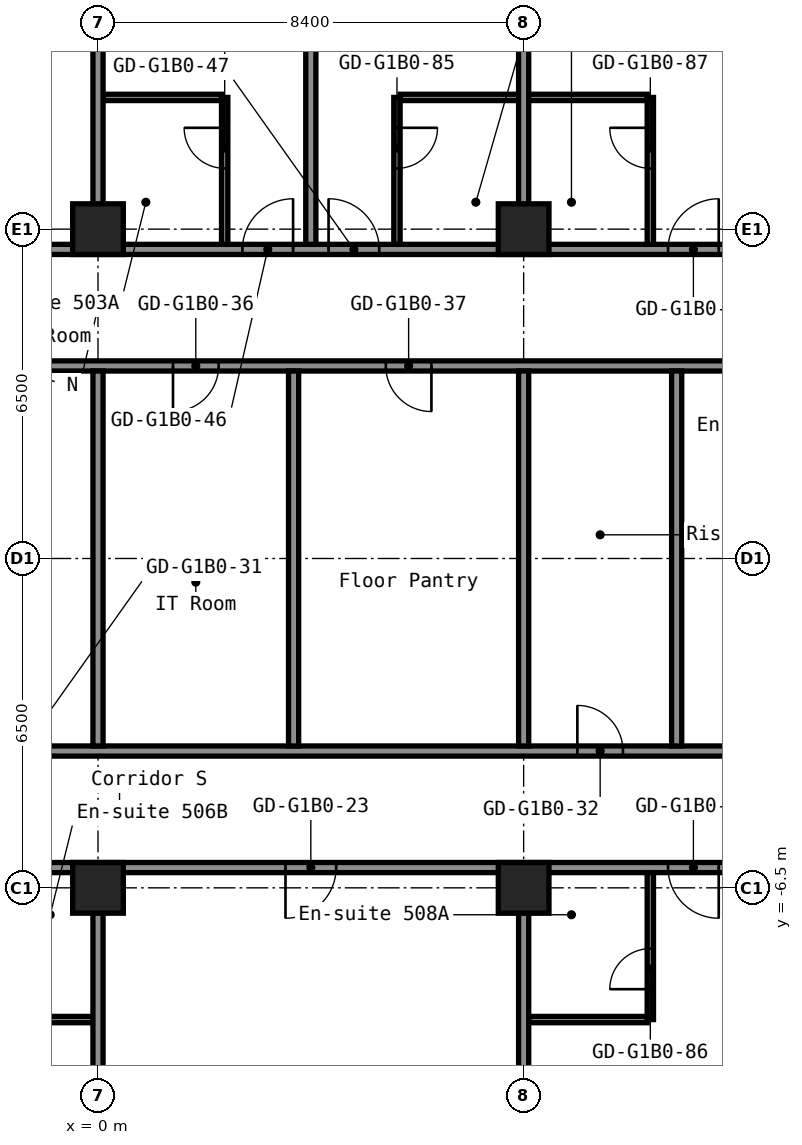
"""IFC4 building model, lengths in metres.
Left out: names, types, materials, properties, quantities, classifications, styles, units other than length and angle.
Written with IfcOpenShell. Run it as: python <this file> out.ifc"""

import sys

from ifc_helpers import new_model, si_unit, direction, frame, frame_2d, origin, origin_2d, place, context, subcontext, project, spatial, rectangle, hollow_rectangle, extrude, element, fill, save


model = new_model("IFC4")
c1 = context("Model", 3, precision=1e-05, world=origin(), true_north=direction((0.0, 1.0)))
c2 = subcontext(c1, "Body", "Model", "MODEL_VIEW")
j1 = project(units=[si_unit("LENGTHUNIT", "METRE"), si_unit("PLANEANGLEUNIT", "RADIAN")], contexts=[c1])
p1 = place(None, origin())
s1 = spatial("IfcSite", under=j1, at=p1, CompositionType="ELEMENT")
p2 = place(p1, origin())
s2 = spatial("IfcBuilding", under=s1, at=p2, CompositionType="ELEMENT")
p3 = place(p2, frame((0.0, 0.0, 23.0)))
s3 = spatial("IfcBuildingStorey", under=s2, at=p3, CompositionType="ELEMENT", Elevation=23.0)
for number, where, z_axis, x_axis in (
    (1, (0.0, -6.5, 0.0), (0.0, 0.0, 1.0), (1.0, 0.0, 0.0)),
    (2, (0.0, 6.5, 0.0), (0.0, 0.0, 1.0), (1.0, 0.0, 0.0)),
    (3, (8.4, -6.5, 0.0), (0.0, 0.0, 1.0), (1.0, 0.0, 0.0)),
    (4, (8.4, 6.5, 0.0), (0.0, 0.0, 1.0), (1.0, 0.0, 0.0)),
):
    element("IfcColumn", number, at=place(p3, frame(where, z_axis=z_axis, x_axis=x_axis)), inside=s3, PredefinedType="COLUMN", context=c2, shape_type="SweptSolid", body=[
        extrude(hollow_rectangle(XDim=1.0, YDim=1.0, WallThickness=0.04, at=origin_2d()), origin(), (0.0, 0.0, 1.0), 2.8),
    ])
for number, where, z_axis, x_axis in (
    (5, (-2.438, -9.1, 0.0), (0.0, 0.0, 1.0), (1.0, 0.0, 0.0)),
    (6, (8.5, -9.1, 0.0), (0.0, 0.0, 1.0), (1.0, 0.0, 0.0)),
):
    element("IfcWall", number, at=place(p3, frame(where, z_axis=z_axis, x_axis=x_axis)), inside=s3, PredefinedType="PARTITIONING", context=c2, shape_type="SweptSolid", body=[
        extrude(rectangle(XDim=2.337, YDim=0.125, at=frame_2d((1.169, 0.0))), origin(), (0.0, 0.0, 1.0), 2.8),
    ])
p4 = place(p3, frame((-16.8, -6.1, 0.0), z_axis=(0.0, 0.0, 1.0), x_axis=(1.0, 0.0, 0.0)))
e7 = element("IfcWall", 7, at=p4, inside=s3, PredefinedType="PARTITIONING", context=c2, shape_type="SweptSolid", body=[
    extrude(rectangle(XDim=33.6, YDim=0.2, at=frame_2d((16.8, 0.0))), origin(), (0.0, 0.0, 1.0), 2.8),
])
p5 = place(p4, frame((2.85, 0.0, 0.0)))
e8 = element("IfcOpeningElement", 8, at=p5, cuts=e7, PredefinedType="OPENING", context=c2, shape_type="SweptSolid", body=[
    extrude(rectangle(XDim=1.0, YDim=2.1, at=frame_2d((0.5, 1.05))), frame((0.0, 0.11, 0.0), z_axis=(0.0, -1.0, 0.0), x_axis=(1.0, 0.0, 0.0)), (0.0, 0.0, 1.0), 0.22),
])
p6 = place(p4, frame((4.55, 0.0, 0.0)))
e9 = element("IfcOpeningElement", 9, at=p6, cuts=e7, PredefinedType="OPENING", context=c2, shape_type="SweptSolid", body=[
    extrude(rectangle(XDim=1.0, YDim=2.1, at=frame_2d((0.5, 1.05))), frame((0.0, 0.11, 0.0), z_axis=(0.0, -1.0, 0.0), x_axis=(1.0, 0.0, 0.0)), (0.0, 0.0, 1.0), 0.22),
])
p7 = place(p4, frame((11.25, 0.0, 0.0)))
e10 = element("IfcOpeningElement", 10, at=p7, cuts=e7, PredefinedType="OPENING", context=c2, shape_type="SweptSolid", body=[
    extrude(rectangle(XDim=1.0, YDim=2.1, at=frame_2d((0.5, 1.05))), frame((0.0, 0.11, 0.0), z_axis=(0.0, -1.0, 0.0), x_axis=(1.0, 0.0, 0.0)), (0.0, 0.0, 1.0), 0.22),
])
p8 = place(p4, frame((12.95, 0.0, 0.0)))
e11 = element("IfcOpeningElement", 11, at=p8, cuts=e7, PredefinedType="OPENING", context=c2, shape_type="SweptSolid", body=[
    extrude(rectangle(XDim=1.0, YDim=2.1, at=frame_2d((0.5, 1.05))), frame((0.0, 0.11, 0.0), z_axis=(0.0, -1.0, 0.0), x_axis=(1.0, 0.0, 0.0)), (0.0, 0.0, 1.0), 0.22),
])
p9 = place(p4, frame((20.5, 0.0, 0.0)))
e12 = element("IfcOpeningElement", 12, at=p9, cuts=e7, PredefinedType="OPENING", context=c2, shape_type="SweptSolid", body=[
    extrude(rectangle(XDim=1.0, YDim=2.1, at=frame_2d((0.5, 1.05))), frame((0.0, 0.11, 0.0), z_axis=(0.0, -1.0, 0.0), x_axis=(1.0, 0.0, 0.0)), (0.0, 0.0, 1.0), 0.22),
])
p10 = place(p4, frame((28.05, 0.0, 0.0)))
e13 = element("IfcOpeningElement", 13, at=p10, cuts=e7, PredefinedType="OPENING", context=c2, shape_type="SweptSolid", body=[
    extrude(rectangle(XDim=1.0, YDim=2.1, at=frame_2d((0.5, 1.05))), frame((0.0, 0.11, 0.0), z_axis=(0.0, -1.0, 0.0), x_axis=(1.0, 0.0, 0.0)), (0.0, 0.0, 1.0), 0.22),
])
p11 = place(p4, frame((29.75, 0.0, 0.0)))
e14 = element("IfcOpeningElement", 14, at=p11, cuts=e7, PredefinedType="OPENING", context=c2, shape_type="SweptSolid", body=[
    extrude(rectangle(XDim=1.0, YDim=2.1, at=frame_2d((0.5, 1.05))), frame((0.0, 0.11, 0.0), z_axis=(0.0, -1.0, 0.0), x_axis=(1.0, 0.0, 0.0)), (0.0, 0.0, 1.0), 0.22),
])
p12 = place(p3, frame((-16.8, -3.8, 0.0), z_axis=(0.0, 0.0, 1.0), x_axis=(1.0, 0.0, 0.0)))
e15 = element("IfcWall", 15, at=p12, inside=s3, PredefinedType="PARTITIONING", context=c2, shape_type="SweptSolid", body=[
    extrude(rectangle(XDim=33.6, YDim=0.2, at=frame_2d((16.8, 0.0))), origin(), (0.0, 0.0, 1.0), 2.8),
])
p13 = place(p12, frame((10.64, 0.0, 0.0)))
e16 = element("IfcOpeningElement", 16, at=p13, cuts=e15, PredefinedType="OPENING", context=c2, shape_type="SweptSolid", body=[
    extrude(rectangle(XDim=0.9, YDim=2.1, at=frame_2d((0.45, 1.05))), frame((0.0, 0.11, 0.0), z_axis=(0.0, -1.0, 0.0), x_axis=(1.0, 0.0, 0.0)), (0.0, 0.0, 1.0), 0.22),
])
p14 = place(p12, frame((14.84, 0.0, 0.0)))
e17 = element("IfcOpeningElement", 17, at=p14, cuts=e15, PredefinedType="OPENING", context=c2, shape_type="SweptSolid", body=[
    extrude(rectangle(XDim=0.9, YDim=2.1, at=frame_2d((0.45, 1.05))), frame((0.0, 0.11, 0.0), z_axis=(0.0, -1.0, 0.0), x_axis=(1.0, 0.0, 0.0)), (0.0, 0.0, 1.0), 0.22),
])
p15 = place(p12, frame((26.26, 0.0, 0.0)))
e18 = element("IfcOpeningElement", 18, at=p15, cuts=e15, PredefinedType="OPENING", context=c2, shape_type="SweptSolid", body=[
    extrude(rectangle(XDim=0.9, YDim=2.1, at=frame_2d((0.45, 1.05))), frame((0.0, 0.11, 0.0), z_axis=(0.0, -1.0, 0.0), x_axis=(1.0, 0.0, 0.0)), (0.0, 0.0, 1.0), 0.22),
])
p16 = place(p12, frame((30.46, 0.0, 0.0)))
e19 = element("IfcOpeningElement", 19, at=p16, cuts=e15, PredefinedType="OPENING", context=c2, shape_type="SweptSolid", body=[
    extrude(rectangle(XDim=0.9, YDim=2.1, at=frame_2d((0.45, 1.05))), frame((0.0, 0.11, 0.0), z_axis=(0.0, -1.0, 0.0), x_axis=(1.0, 0.0, 0.0)), (0.0, 0.0, 1.0), 0.22),
])
p17 = place(p3, frame((-16.8, 3.8, 0.0), z_axis=(0.0, 0.0, 1.0), x_axis=(1.0, 0.0, 0.0)))
e20 = element("IfcWall", 20, at=p17, inside=s3, PredefinedType="PARTITIONING", context=c2, shape_type="SweptSolid", body=[
    extrude(rectangle(XDim=33.6, YDim=0.2, at=frame_2d((16.8, 0.0))), origin(), (0.0, 0.0, 1.0), 2.8),
])
p18 = place(p17, frame((2.155, 0.0, 0.0)))
e21 = element("IfcOpeningElement", 21, at=p18, cuts=e20, PredefinedType="OPENING", context=c2, shape_type="SweptSolid", body=[
    extrude(rectangle(XDim=0.9, YDim=2.1, at=frame_2d((0.45, 1.05))), frame((0.0, 0.11, 0.0), z_axis=(0.0, -1.0, 0.0), x_axis=(1.0, 0.0, 0.0)), (0.0, 0.0, 1.0), 0.22),
])
p19 = place(p17, frame((6.355, 0.0, 0.0)))
e22 = element("IfcOpeningElement", 22, at=p19, cuts=e20, PredefinedType="OPENING", context=c2, shape_type="SweptSolid", body=[
    extrude(rectangle(XDim=0.9, YDim=2.1, at=frame_2d((0.45, 1.05))), frame((0.0, 0.11, 0.0), z_axis=(0.0, -1.0, 0.0), x_axis=(1.0, 0.0, 0.0)), (0.0, 0.0, 1.0), 0.22),
])
p20 = place(p17, frame((18.28, 0.0, 0.0)))
e23 = element("IfcOpeningElement", 23, at=p20, cuts=e20, PredefinedType="OPENING", context=c2, shape_type="SweptSolid", body=[
    extrude(rectangle(XDim=0.9, YDim=2.1, at=frame_2d((0.45, 1.05))), frame((0.0, 0.11, 0.0), z_axis=(0.0, -1.0, 0.0), x_axis=(1.0, 0.0, 0.0)), (0.0, 0.0, 1.0), 0.22),
])
p21 = place(p17, frame((22.48, 0.0, 0.0)))
e24 = element("IfcOpeningElement", 24, at=p21, cuts=e20, PredefinedType="OPENING", context=c2, shape_type="SweptSolid", body=[
    extrude(rectangle(XDim=0.9, YDim=2.1, at=frame_2d((0.45, 1.05))), frame((0.0, 0.11, 0.0), z_axis=(0.0, -1.0, 0.0), x_axis=(1.0, 0.0, 0.0)), (0.0, 0.0, 1.0), 0.22),
])
p22 = place(p3, frame((-16.8, 6.1, 0.0), z_axis=(0.0, 0.0, 1.0), x_axis=(1.0, 0.0, 0.0)))
e25 = element("IfcWall", 25, at=p22, inside=s3, PredefinedType="PARTITIONING", context=c2, shape_type="SweptSolid", body=[
    extrude(rectangle(XDim=33.6, YDim=0.2, at=frame_2d((16.8, 0.0))), origin(), (0.0, 0.0, 1.0), 2.8),
])
p23 = place(p22, frame((2.85, 0.0, 0.0)))
e26 = element("IfcOpeningElement", 26, at=p23, cuts=e25, PredefinedType="OPENING", context=c2, shape_type="SweptSolid", body=[
    extrude(rectangle(XDim=1.0, YDim=2.1, at=frame_2d((0.5, 1.05))), frame((0.0, 0.11, 0.0), z_axis=(0.0, -1.0, 0.0), x_axis=(1.0, 0.0, 0.0)), (0.0, 0.0, 1.0), 0.22),
])
p24 = place(p22, frame((4.55, 0.0, 0.0)))
e27 = element("IfcOpeningElement", 27, at=p24, cuts=e25, PredefinedType="OPENING", context=c2, shape_type="SweptSolid", body=[
    extrude(rectangle(XDim=1.0, YDim=2.1, at=frame_2d((0.5, 1.05))), frame((0.0, 0.11, 0.0), z_axis=(0.0, -1.0, 0.0), x_axis=(1.0, 0.0, 0.0)), (0.0, 0.0, 1.0), 0.22),
])
p25 = place(p22, frame((9.545, 0.0, 0.0)))
e28 = element("IfcOpeningElement", 28, at=p25, cuts=e25, PredefinedType="OPENING", context=c2, shape_type="SweptSolid", body=[
    extrude(rectangle(XDim=0.9, YDim=2.1, at=frame_2d((0.45, 1.05))), frame((0.0, 0.11, 0.0), z_axis=(0.0, -1.0, 0.0), x_axis=(1.0, 0.0, 0.0)), (0.0, 0.0, 1.0), 0.22),
])
p26 = place(p22, frame((13.745, 0.0, 0.0)))
e29 = element("IfcOpeningElement", 29, at=p26, cuts=e25, PredefinedType="OPENING", context=c2, shape_type="SweptSolid", body=[
    extrude(rectangle(XDim=0.9, YDim=2.1, at=frame_2d((0.45, 1.05))), frame((0.0, 0.11, 0.0), z_axis=(0.0, -1.0, 0.0), x_axis=(1.0, 0.0, 0.0)), (0.0, 0.0, 1.0), 0.22),
])
p27 = place(p22, frame((19.65, 0.0, 0.0)))
e30 = element("IfcOpeningElement", 30, at=p27, cuts=e25, PredefinedType="OPENING", context=c2, shape_type="SweptSolid", body=[
    extrude(rectangle(XDim=1.0, YDim=2.1, at=frame_2d((0.5, 1.05))), frame((0.0, 0.11, 0.0), z_axis=(0.0, -1.0, 0.0), x_axis=(1.0, 0.0, 0.0)), (0.0, 0.0, 1.0), 0.22),
])
p28 = place(p22, frame((21.35, 0.0, 0.0)))
e31 = element("IfcOpeningElement", 31, at=p28, cuts=e25, PredefinedType="OPENING", context=c2, shape_type="SweptSolid", body=[
    extrude(rectangle(XDim=1.0, YDim=2.1, at=frame_2d((0.5, 1.05))), frame((0.0, 0.11, 0.0), z_axis=(0.0, -1.0, 0.0), x_axis=(1.0, 0.0, 0.0)), (0.0, 0.0, 1.0), 0.22),
])
p29 = place(p22, frame((28.05, 0.0, 0.0)))
e32 = element("IfcOpeningElement", 32, at=p29, cuts=e25, PredefinedType="OPENING", context=c2, shape_type="SweptSolid", body=[
    extrude(rectangle(XDim=1.0, YDim=2.1, at=frame_2d((0.5, 1.05))), frame((0.0, 0.11, 0.0), z_axis=(0.0, -1.0, 0.0), x_axis=(1.0, 0.0, 0.0)), (0.0, 0.0, 1.0), 0.22),
])
p30 = place(p22, frame((29.75, 0.0, 0.0)))
e33 = element("IfcOpeningElement", 33, at=p30, cuts=e25, PredefinedType="OPENING", context=c2, shape_type="SweptSolid", body=[
    extrude(rectangle(XDim=1.0, YDim=2.1, at=frame_2d((0.5, 1.05))), frame((0.0, 0.11, 0.0), z_axis=(0.0, -1.0, 0.0), x_axis=(1.0, 0.0, 0.0)), (0.0, 0.0, 1.0), 0.22),
])
p31 = place(p3, frame((0.1, 9.1, 0.0), z_axis=(0.0, 0.0, 1.0), x_axis=(1.0, 0.0, 0.0)))
e34 = element("IfcWall", 34, at=p31, inside=s3, PredefinedType="PARTITIONING", context=c2, shape_type="SweptSolid", body=[
    extrude(rectangle(XDim=2.337, YDim=0.125, at=frame_2d((1.169, 0.0))), origin(), (0.0, 0.0, 1.0), 2.8),
])
p32 = place(p3, frame((5.962, 9.1, 0.0), z_axis=(0.0, 0.0, 1.0), x_axis=(1.0, 0.0, 0.0)))
e35 = element("IfcWall", 35, at=p32, inside=s3, PredefinedType="PARTITIONING", context=c2, shape_type="SweptSolid", body=[
    extrude(rectangle(XDim=4.875, YDim=0.125, at=frame_2d((2.438, 0.0))), origin(), (0.0, 0.0, 1.0), 2.8),
])
p33 = place(p3, frame((0.0, -20.3, 0.0), z_axis=(0.0, 0.0, 1.0), x_axis=(0.0, 1.0, 0.0)))
e36 = element("IfcWall", 36, at=p33, inside=s3, PredefinedType="PARTITIONING", context=c2, shape_type="SweptSolid", body=[
    extrude(rectangle(XDim=13.31, YDim=0.2, at=frame_2d((6.655, 0.0))), origin(), (0.0, 0.0, 1.0), 2.8),
])
p34 = place(p3, frame((0.0, -3.7, 0.0), z_axis=(0.0, 0.0, 1.0), x_axis=(0.0, 1.0, 0.0)))
e37 = element("IfcWall", 37, at=p34, inside=s3, PredefinedType="PARTITIONING", context=c2, shape_type="SweptSolid", body=[
    extrude(rectangle(XDim=7.4, YDim=0.2, at=frame_2d((3.7, 0.0))), origin(), (0.0, 0.0, 1.0), 2.8),
])
p35 = place(p3, frame((0.0, 6.99, 0.0), z_axis=(0.0, 0.0, 1.0), x_axis=(0.0, 1.0, 0.0)))
e38 = element("IfcWall", 38, at=p35, inside=s3, PredefinedType="PARTITIONING", context=c2, shape_type="SweptSolid", body=[
    extrude(rectangle(XDim=13.31, YDim=0.2, at=frame_2d((6.655, 0.0))), origin(), (0.0, 0.0, 1.0), 2.8),
])
p36 = place(p3, frame((2.5, 6.2, 0.0), z_axis=(0.0, 0.0, 1.0), x_axis=(0.0, 1.0, 0.0)))
e39 = element("IfcWall", 39, at=p36, inside=s3, PredefinedType="PARTITIONING", context=c2, shape_type="SweptSolid", body=[
    extrude(rectangle(XDim=2.9, YDim=0.125, at=frame_2d((1.45, 0.0))), origin(), (0.0, 0.0, 1.0), 2.8),
])
p37 = place(p36, frame((1.5, 0.0, 0.0)))
e40 = element("IfcOpeningElement", 40, at=p37, cuts=e39, PredefinedType="OPENING", context=c2, shape_type="SweptSolid", body=[
    extrude(rectangle(XDim=0.8, YDim=2.1, at=frame_2d((0.4, 1.05))), frame((0.0, 0.073, 0.0), z_axis=(0.0, -1.0, 0.0), x_axis=(1.0, 0.0, 0.0)), (0.0, 0.0, 1.0), 0.145),
])
p38 = place(p3, frame((3.86, -3.7, 0.0), z_axis=(0.0, 0.0, 1.0), x_axis=(0.0, 1.0, 0.0)))
e41 = element("IfcWall", 41, at=p38, inside=s3, PredefinedType="PARTITIONING", context=c2, shape_type="SweptSolid", body=[
    extrude(rectangle(XDim=7.4, YDim=0.2, at=frame_2d((3.7, 0.0))), origin(), (0.0, 0.0, 1.0), 2.8),
])
p39 = place(p3, frame((4.2, 6.2, 0.0), z_axis=(0.0, 0.0, 1.0), x_axis=(0.0, 1.0, 0.0)))
e42 = element("IfcWall", 42, at=p39, inside=s3, PredefinedType="PARTITIONING", context=c2, shape_type="SweptSolid", body=[
    extrude(rectangle(XDim=14.1, YDim=0.2, at=frame_2d((7.05, 0.0))), origin(), (0.0, 0.0, 1.0), 2.8),
])
p40 = place(p3, frame((5.9, 6.2, 0.0), z_axis=(0.0, 0.0, 1.0), x_axis=(0.0, 1.0, 0.0)))
e43 = element("IfcWall", 43, at=p40, inside=s3, PredefinedType="PARTITIONING", context=c2, shape_type="SweptSolid", body=[
    extrude(rectangle(XDim=2.9, YDim=0.125, at=frame_2d((1.45, 0.0))), origin(), (0.0, 0.0, 1.0), 2.8),
])
p41 = place(p40, frame((1.5, 0.0, 0.0)))
e44 = element("IfcOpeningElement", 44, at=p41, cuts=e43, PredefinedType="OPENING", context=c2, shape_type="SweptSolid", body=[
    extrude(rectangle(XDim=0.8, YDim=2.1, at=frame_2d((0.4, 1.05))), frame((0.0, 0.073, 0.0), z_axis=(0.0, -1.0, 0.0), x_axis=(1.0, 0.0, 0.0)), (0.0, 0.0, 1.0), 0.145),
])
p42 = place(p3, frame((8.4, -20.3, 0.0), z_axis=(0.0, 0.0, 1.0), x_axis=(0.0, 1.0, 0.0)))
e45 = element("IfcWall", 45, at=p42, inside=s3, PredefinedType="PARTITIONING", context=c2, shape_type="SweptSolid", body=[
    extrude(rectangle(XDim=13.31, YDim=0.2, at=frame_2d((6.655, 0.0))), origin(), (0.0, 0.0, 1.0), 2.8),
])
p43 = place(p3, frame((8.4, -3.7, 0.0), z_axis=(0.0, 0.0, 1.0), x_axis=(0.0, 1.0, 0.0)))
e46 = element("IfcWall", 46, at=p43, inside=s3, PredefinedType="PARTITIONING", context=c2, shape_type="SweptSolid", body=[
    extrude(rectangle(XDim=7.4, YDim=0.2, at=frame_2d((3.7, 0.0))), origin(), (0.0, 0.0, 1.0), 2.8),
])
p44 = place(p3, frame((8.4, 6.99, 0.0), z_axis=(0.0, 0.0, 1.0), x_axis=(0.0, 1.0, 0.0)))
e47 = element("IfcWall", 47, at=p44, inside=s3, PredefinedType="PARTITIONING", context=c2, shape_type="SweptSolid", body=[
    extrude(rectangle(XDim=13.31, YDim=0.2, at=frame_2d((6.655, 0.0))), origin(), (0.0, 0.0, 1.0), 2.8),
])
p45 = place(p3, frame((10.9, -9.1, 0.0), z_axis=(0.0, 0.0, 1.0), x_axis=(0.0, 1.0, 0.0)))
e48 = element("IfcWall", 48, at=p45, inside=s3, PredefinedType="PARTITIONING", context=c2, shape_type="SweptSolid", body=[
    extrude(rectangle(XDim=2.9, YDim=0.125, at=frame_2d((1.45, 0.0))), origin(), (0.0, 0.0, 1.0), 2.8),
])
p46 = place(p45, frame((0.6, 0.0, 0.0)))
e49 = element("IfcOpeningElement", 49, at=p46, cuts=e48, PredefinedType="OPENING", context=c2, shape_type="SweptSolid", body=[
    extrude(rectangle(XDim=0.8, YDim=2.1, at=frame_2d((0.4, 1.05))), frame((0.0, 0.073, 0.0), z_axis=(0.0, -1.0, 0.0), x_axis=(1.0, 0.0, 0.0)), (0.0, 0.0, 1.0), 0.145),
])
p47 = place(p3, frame((10.9, 6.2, 0.0), z_axis=(0.0, 0.0, 1.0), x_axis=(0.0, 1.0, 0.0)))
e50 = element("IfcWall", 50, at=p47, inside=s3, PredefinedType="PARTITIONING", context=c2, shape_type="SweptSolid", body=[
    extrude(rectangle(XDim=2.9, YDim=0.125, at=frame_2d((1.45, 0.0))), origin(), (0.0, 0.0, 1.0), 2.8),
])
p48 = place(p47, frame((1.5, 0.0, 0.0)))
e51 = element("IfcOpeningElement", 51, at=p48, cuts=e50, PredefinedType="OPENING", context=c2, shape_type="SweptSolid", body=[
    extrude(rectangle(XDim=0.8, YDim=2.1, at=frame_2d((0.4, 1.05))), frame((0.0, 0.073, 0.0), z_axis=(0.0, -1.0, 0.0), x_axis=(1.0, 0.0, 0.0)), (0.0, 0.0, 1.0), 0.145),
])
p49 = place(p3, frame((11.42, -3.7, 0.0), z_axis=(0.0, 0.0, 1.0), x_axis=(0.0, 1.0, 0.0)))
e52 = element("IfcWall", 52, at=p49, inside=s3, PredefinedType="PARTITIONING", context=c2, shape_type="SweptSolid", body=[
    extrude(rectangle(XDim=7.4, YDim=0.2, at=frame_2d((3.7, 0.0))), origin(), (0.0, 0.0, 1.0), 2.8),
])
p50 = place(p9, origin())
e53 = element("IfcDoor", 53, at=p50, inside=s3, OperationType="SINGLE_SWING_LEFT", PredefinedType="DOOR", context=c2, shape_type="SweptSolid", body=[
    extrude(rectangle(XDim=1.0, YDim=2.1, at=frame_2d((0.5, 1.05))), frame((0.0, 0.025, 0.0), z_axis=(0.0, -1.0, 0.0), x_axis=(1.0, 0.0, 0.0)), (0.0, 0.0, 1.0), 0.05),
])
fill(e12, e53)
p51 = place(p10, origin())
e54 = element("IfcDoor", 54, at=p51, inside=s3, OperationType="SINGLE_SWING_RIGHT", PredefinedType="DOOR", context=c2, shape_type="SweptSolid", body=[
    extrude(rectangle(XDim=1.0, YDim=2.1, at=frame_2d((0.5, 1.05))), frame((0.0, 0.025, 0.0), z_axis=(0.0, -1.0, 0.0), x_axis=(1.0, 0.0, 0.0)), (0.0, 0.0, 1.0), 0.05),
])
fill(e13, e54)
p52 = place(p15, origin())
e55 = element("IfcDoor", 55, at=p52, inside=s3, OperationType="SINGLE_SWING_RIGHT", PredefinedType="DOOR", context=c2, shape_type="SweptSolid", body=[
    extrude(rectangle(XDim=0.9, YDim=2.1, at=frame_2d((0.45, 1.05))), frame((0.0, 0.025, 0.0), z_axis=(0.0, -1.0, 0.0), x_axis=(1.0, 0.0, 0.0)), (0.0, 0.0, 1.0), 0.05),
])
fill(e18, e55)
p53 = place(p20, origin())
e56 = element("IfcDoor", 56, at=p53, inside=s3, OperationType="SINGLE_SWING_LEFT", PredefinedType="DOOR", context=c2, shape_type="SweptSolid", body=[
    extrude(rectangle(XDim=0.9, YDim=2.1, at=frame_2d((0.45, 1.05))), frame((0.0, 0.025, 0.0), z_axis=(0.0, -1.0, 0.0), x_axis=(1.0, 0.0, 0.0)), (0.0, 0.0, 1.0), 0.05),
])
fill(e23, e56)
p54 = place(p21, origin())
e57 = element("IfcDoor", 57, at=p54, inside=s3, OperationType="SINGLE_SWING_RIGHT", PredefinedType="DOOR", context=c2, shape_type="SweptSolid", body=[
    extrude(rectangle(XDim=0.9, YDim=2.1, at=frame_2d((0.45, 1.05))), frame((0.0, 0.025, 0.0), z_axis=(0.0, -1.0, 0.0), x_axis=(1.0, 0.0, 0.0)), (0.0, 0.0, 1.0), 0.05),
])
fill(e24, e57)
p55 = place(p27, origin())
e58 = element("IfcDoor", 58, at=p55, inside=s3, OperationType="SINGLE_SWING_LEFT", PredefinedType="DOOR", context=c2, shape_type="SweptSolid", body=[
    extrude(rectangle(XDim=1.0, YDim=2.1, at=frame_2d((0.5, 1.05))), frame((0.0, 0.025, 0.0), z_axis=(0.0, -1.0, 0.0), x_axis=(1.0, 0.0, 0.0)), (0.0, 0.0, 1.0), 0.05),
])
fill(e30, e58)
p56 = place(p28, origin())
e59 = element("IfcDoor", 59, at=p56, inside=s3, OperationType="SINGLE_SWING_RIGHT", PredefinedType="DOOR", context=c2, shape_type="SweptSolid", body=[
    extrude(rectangle(XDim=1.0, YDim=2.1, at=frame_2d((0.5, 1.05))), frame((0.0, 0.025, 0.0), z_axis=(0.0, -1.0, 0.0), x_axis=(1.0, 0.0, 0.0)), (0.0, 0.0, 1.0), 0.05),
])
fill(e31, e59)
p57 = place(p29, origin())
e60 = element("IfcDoor", 60, at=p57, inside=s3, OperationType="SINGLE_SWING_LEFT", PredefinedType="DOOR", context=c2, shape_type="SweptSolid", body=[
    extrude(rectangle(XDim=1.0, YDim=2.1, at=frame_2d((0.5, 1.05))), frame((0.0, 0.025, 0.0), z_axis=(0.0, -1.0, 0.0), x_axis=(1.0, 0.0, 0.0)), (0.0, 0.0, 1.0), 0.05),
])
fill(e32, e60)
p58 = place(p37, origin())
e61 = element("IfcDoor", 61, at=p58, inside=s3, OperationType="SINGLE_SWING_LEFT", PredefinedType="DOOR", context=c2, shape_type="SweptSolid", body=[
    extrude(rectangle(XDim=0.8, YDim=2.1, at=frame_2d((0.4, 1.05))), frame((0.0, 0.025, 0.0), z_axis=(0.0, -1.0, 0.0), x_axis=(1.0, 0.0, 0.0)), (0.0, 0.0, 1.0), 0.05),
])
fill(e40, e61)
p59 = place(p41, origin())
e62 = element("IfcDoor", 62, at=p59, inside=s3, OperationType="SINGLE_SWING_RIGHT", PredefinedType="DOOR", context=c2, shape_type="SweptSolid", body=[
    extrude(rectangle(XDim=0.8, YDim=2.1, at=frame_2d((0.4, 1.05))), frame((0.0, 0.025, 0.0), z_axis=(0.0, -1.0, 0.0), x_axis=(1.0, 0.0, 0.0)), (0.0, 0.0, 1.0), 0.05),
])
fill(e44, e62)
p60 = place(p46, origin())
e63 = element("IfcDoor", 63, at=p60, inside=s3, OperationType="SINGLE_SWING_RIGHT", PredefinedType="DOOR", context=c2, shape_type="SweptSolid", body=[
    extrude(rectangle(XDim=0.8, YDim=2.1, at=frame_2d((0.4, 1.05))), frame((0.0, 0.025, 0.0), z_axis=(0.0, -1.0, 0.0), x_axis=(1.0, 0.0, 0.0)), (0.0, 0.0, 1.0), 0.05),
])
fill(e49, e63)
p61 = place(p48, origin())
e64 = element("IfcDoor", 64, at=p61, inside=s3, OperationType="SINGLE_SWING_LEFT", PredefinedType="DOOR", context=c2, shape_type="SweptSolid", body=[
    extrude(rectangle(XDim=0.8, YDim=2.1, at=frame_2d((0.4, 1.05))), frame((0.0, 0.025, 0.0), z_axis=(0.0, -1.0, 0.0), x_axis=(1.0, 0.0, 0.0)), (0.0, 0.0, 1.0), 0.05),
])
fill(e51, e64)
save(model, sys.argv[1])
